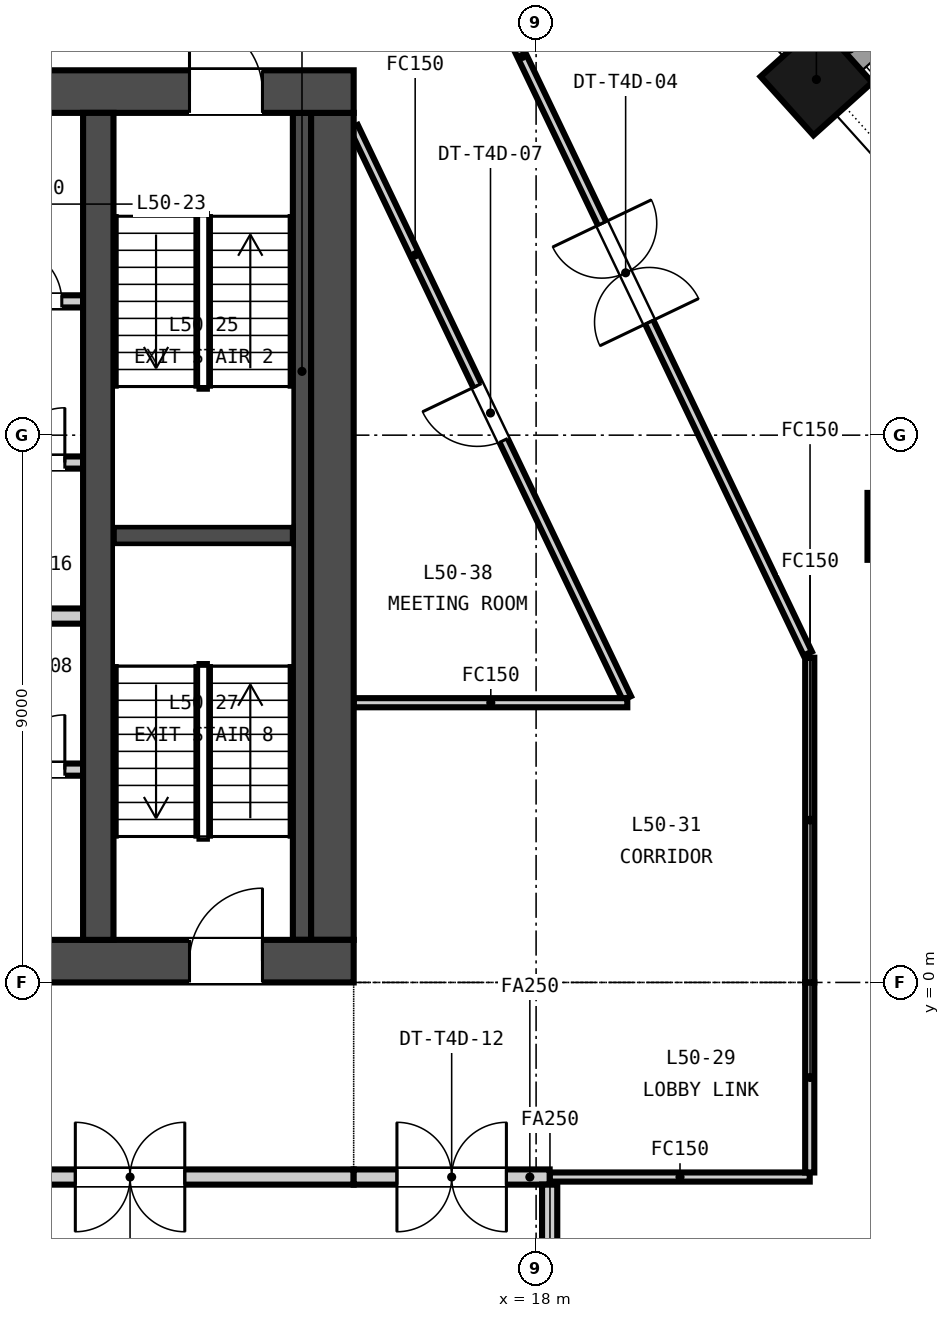
"""IFC4 building model, lengths in metres.
Left out: names, types, materials, properties, quantities, classifications, styles, units other than length and angle.
Written with IfcOpenShell. Run it as: python <this file> out.ifc"""

import sys

from ifc_helpers import new_model, si_unit, direction, frame, frame_2d, origin, origin_2d, place, context, subcontext, project, spatial, rectangle, extrude, element, fill, save


model = new_model("IFC4")
c1 = context("Model", 3, precision=1e-05, world=origin(), true_north=direction((0.0, 1.0)))
c2 = subcontext(c1, "Body", "Model", "MODEL_VIEW")
j1 = project(units=[si_unit("LENGTHUNIT", "METRE"), si_unit("PLANEANGLEUNIT", "RADIAN")], contexts=[c1])
p1 = place(None, origin())
s1 = spatial("IfcSite", under=j1, at=p1, CompositionType="ELEMENT")
p2 = place(p1, origin())
s2 = spatial("IfcBuilding", under=s1, at=p2, CompositionType="ELEMENT")
p3 = place(p2, frame((0.0, 0.0, 200.0)))
s3 = spatial("IfcBuildingStorey", under=s2, at=p3, CompositionType="ELEMENT", Elevation=200.0)
p4 = place(p3, frame((-15.0, 0.35, -0.15), z_axis=(0.0, 0.0, 1.0), x_axis=(1.0, 0.0, 0.0)))
e1 = element("IfcWall", 1, at=p4, inside=s3, PredefinedType="SOLIDWALL", context=c2, shape_type="SweptSolid", body=[
    extrude(rectangle(XDim=30.0, YDim=0.7, at=frame_2d((15.0, 0.0))), origin(), (0.0, 0.0, 1.0), 3.65),
])
p5 = place(p4, frame((5.8, 0.0, 0.15)))
e2 = element("IfcOpeningElement", 2, at=p5, cuts=e1, PredefinedType="OPENING", context=c2, shape_type="SweptSolid", body=[
    extrude(rectangle(XDim=2.4, YDim=2.4, at=frame_2d((1.2, 1.2))), frame((0.0, 0.36, 0.0), z_axis=(0.0, -1.0, 0.0), x_axis=(1.0, 0.0, 0.0)), (0.0, 0.0, 1.0), 0.72),
])
p6 = place(p4, frame((13.8, 0.0, 0.15)))
e3 = element("IfcOpeningElement", 3, at=p6, cuts=e1, PredefinedType="OPENING", context=c2, shape_type="SweptSolid", body=[
    extrude(rectangle(XDim=2.4, YDim=2.4, at=frame_2d((1.2, 1.2))), frame((0.0, 0.36, 0.0), z_axis=(0.0, -1.0, 0.0), x_axis=(1.0, 0.0, 0.0)), (0.0, 0.0, 1.0), 0.72),
])
p7 = place(p4, frame((21.8, 0.0, 0.15)))
e4 = element("IfcOpeningElement", 4, at=p7, cuts=e1, PredefinedType="OPENING", context=c2, shape_type="SweptSolid", body=[
    extrude(rectangle(XDim=2.4, YDim=2.4, at=frame_2d((1.2, 1.2))), frame((0.0, 0.36, 0.0), z_axis=(0.0, -1.0, 0.0), x_axis=(1.0, 0.0, 0.0)), (0.0, 0.0, 1.0), 0.72),
])
p8 = place(p4, frame((1.5, 0.0, 0.15)))
e5 = element("IfcOpeningElement", 5, at=p8, cuts=e1, PredefinedType="OPENING", context=c2, shape_type="SweptSolid", body=[
    extrude(rectangle(XDim=1.2, YDim=2.1, at=frame_2d((0.6, 1.05))), frame((0.0, 0.36, 0.0), z_axis=(0.0, -1.0, 0.0), x_axis=(1.0, 0.0, 0.0)), (0.0, 0.0, 1.0), 0.72),
])
p9 = place(p4, frame((27.3, 0.0, 0.15)))
e6 = element("IfcOpeningElement", 6, at=p9, cuts=e1, PredefinedType="OPENING", context=c2, shape_type="SweptSolid", body=[
    extrude(rectangle(XDim=1.2, YDim=2.1, at=frame_2d((0.6, 1.05))), frame((0.0, 0.36, 0.0), z_axis=(0.0, -1.0, 0.0), x_axis=(1.0, 0.0, 0.0)), (0.0, 0.0, 1.0), 0.72),
])
p10 = place(p3, frame((-15.0, 14.65, -0.15), z_axis=(0.0, 0.0, 1.0), x_axis=(1.0, 0.0, 0.0)))
e7 = element("IfcWall", 7, at=p10, inside=s3, PredefinedType="SOLIDWALL", context=c2, shape_type="SweptSolid", body=[
    extrude(rectangle(XDim=30.0, YDim=0.7, at=frame_2d((15.0, 0.0))), origin(), (0.0, 0.0, 1.0), 3.65),
])
p11 = place(p10, frame((9.25, 0.0, 0.15)))
e8 = element("IfcOpeningElement", 8, at=p11, cuts=e7, PredefinedType="OPENING", context=c2, shape_type="SweptSolid", body=[
    extrude(rectangle(XDim=1.5, YDim=2.1, at=frame_2d((0.75, 1.05))), frame((0.0, 0.36, 0.0), z_axis=(0.0, -1.0, 0.0), x_axis=(1.0, 0.0, 0.0)), (0.0, 0.0, 1.0), 0.72),
])
p12 = place(p10, frame((19.4, 0.0, 0.15)))
e9 = element("IfcOpeningElement", 9, at=p12, cuts=e7, PredefinedType="OPENING", context=c2, shape_type="SweptSolid", body=[
    extrude(rectangle(XDim=1.5, YDim=2.1, at=frame_2d((0.75, 1.05))), frame((0.0, 0.36, 0.0), z_axis=(0.0, -1.0, 0.0), x_axis=(1.0, 0.0, 0.0)), (0.0, 0.0, 1.0), 0.72),
])
p13 = place(p10, frame((1.5, 0.0, 0.15)))
e10 = element("IfcOpeningElement", 10, at=p13, cuts=e7, PredefinedType="OPENING", context=c2, shape_type="SweptSolid", body=[
    extrude(rectangle(XDim=1.2, YDim=2.1, at=frame_2d((0.6, 1.05))), frame((0.0, 0.36, 0.0), z_axis=(0.0, -1.0, 0.0), x_axis=(1.0, 0.0, 0.0)), (0.0, 0.0, 1.0), 0.72),
])
p14 = place(p10, frame((27.3, 0.0, 0.15)))
e11 = element("IfcOpeningElement", 11, at=p14, cuts=e7, PredefinedType="OPENING", context=c2, shape_type="SweptSolid", body=[
    extrude(rectangle(XDim=1.2, YDim=2.1, at=frame_2d((0.6, 1.05))), frame((0.0, 0.36, 0.0), z_axis=(0.0, -1.0, 0.0), x_axis=(1.0, 0.0, 0.0)), (0.0, 0.0, 1.0), 0.72),
])
p15 = place(p3, frame((14.65, 0.7, -0.15), z_axis=(0.0, 0.0, 1.0), x_axis=(0.0, 1.0, 0.0)))
e12 = element("IfcWall", 12, at=p15, inside=s3, PredefinedType="SOLIDWALL", context=c2, shape_type="SweptSolid", body=[
    extrude(rectangle(XDim=13.6, YDim=0.7, at=frame_2d((6.8, 0.0))), origin(), (0.0, 0.0, 1.0), 3.65),
])
p16 = place(p3, frame((10.8, 0.7, -0.15), z_axis=(0.0, 0.0, 1.0), x_axis=(0.0, 1.0, 0.0)))
e13 = element("IfcWall", 13, at=p16, inside=s3, PredefinedType="SOLIDWALL", context=c2, shape_type="SweptSolid", body=[
    extrude(rectangle(XDim=13.6, YDim=0.5, at=frame_2d((6.8, 0.0))), origin(), (0.0, 0.0, 1.0), 3.65),
])
p17 = place(p3, frame((22.61, 14.849, -0.15), z_axis=(0.0, 0.0, 1.0), x_axis=(-0.669130606359, 0.743144825477, 0.0)))
e14 = element("IfcColumn", 14, at=p17, inside=s3, PredefinedType="COLUMN", context=c2, shape_type="SweptSolid", body=[
    extrude(rectangle(XDim=1.3, YDim=1.3, at=origin_2d()), origin(), (0.0, 0.0, 1.0), 3.65),
])
p18 = place(p3, frame((24.0, 7.5, -0.15), z_axis=(0.0, 0.0, 1.0), x_axis=(1.0, 0.0, 0.0)))
e15 = element("IfcColumn", 15, at=p18, inside=s3, PredefinedType="COLUMN", context=c2, shape_type="SweptSolid", body=[
    extrude(rectangle(XDim=1.1, YDim=1.1, at=origin_2d()), origin(), (0.0, 0.0, 1.0), 3.65),
])
p19 = place(p3, frame((-10.55, 3.5, 0.0), z_axis=(0.0, 0.0, 1.0), x_axis=(1.0, 0.0, 0.0)))
e16 = element("IfcWall", 16, at=p19, inside=s3, PredefinedType="PARTITIONING", context=c2, shape_type="SweptSolid", body=[
    extrude(rectangle(XDim=21.1, YDim=0.2, at=frame_2d((10.55, 0.0))), origin(), (0.0, 0.0, 1.0), 3.5),
])
p20 = place(p19, frame((1.262, 0.0, 0.0)))
e17 = element("IfcOpeningElement", 17, at=p20, cuts=e16, PredefinedType="OPENING", context=c2, shape_type="SweptSolid", body=[
    extrude(rectangle(XDim=1.0, YDim=2.1, at=frame_2d((0.5, 1.05))), frame((0.0, 0.11, 0.0), z_axis=(0.0, -1.0, 0.0), x_axis=(1.0, 0.0, 0.0)), (0.0, 0.0, 1.0), 0.22),
])
p21 = place(p19, frame((6.0, 0.0, 0.0)))
e18 = element("IfcOpeningElement", 18, at=p21, cuts=e16, PredefinedType="OPENING", context=c2, shape_type="SweptSolid", body=[
    extrude(rectangle(XDim=1.0, YDim=2.1, at=frame_2d((0.5, 1.05))), frame((0.0, 0.11, 0.0), z_axis=(0.0, -1.0, 0.0), x_axis=(1.0, 0.0, 0.0)), (0.0, 0.0, 1.0), 0.22),
])
p22 = place(p19, frame((11.1, 0.0, 0.0)))
e19 = element("IfcOpeningElement", 19, at=p22, cuts=e16, PredefinedType="OPENING", context=c2, shape_type="SweptSolid", body=[
    extrude(rectangle(XDim=1.0, YDim=2.1, at=frame_2d((0.5, 1.05))), frame((0.0, 0.11, 0.0), z_axis=(0.0, -1.0, 0.0), x_axis=(1.0, 0.0, 0.0)), (0.0, 0.0, 1.0), 0.22),
])
p23 = place(p19, frame((16.113, 0.0, 0.0)))
e20 = element("IfcOpeningElement", 20, at=p23, cuts=e16, PredefinedType="OPENING", context=c2, shape_type="SweptSolid", body=[
    extrude(rectangle(XDim=1.0, YDim=2.1, at=frame_2d((0.5, 1.05))), frame((0.0, 0.11, 0.0), z_axis=(0.0, -1.0, 0.0), x_axis=(1.0, 0.0, 0.0)), (0.0, 0.0, 1.0), 0.22),
])
p24 = place(p19, frame((19.9, 0.0, 0.0)))
e21 = element("IfcOpeningElement", 21, at=p24, cuts=e16, PredefinedType="OPENING", context=c2, shape_type="SweptSolid", body=[
    extrude(rectangle(XDim=0.9, YDim=2.1, at=frame_2d((0.45, 1.05))), frame((0.0, 0.11, 0.0), z_axis=(0.0, -1.0, 0.0), x_axis=(1.0, 0.0, 0.0)), (0.0, 0.0, 1.0), 0.22),
])
p25 = place(p3, frame((-10.55, 6.025, 0.0), z_axis=(0.0, 0.0, 1.0), x_axis=(1.0, 0.0, 0.0)))
e22 = element("IfcWall", 22, at=p25, inside=s3, PredefinedType="PARTITIONING", context=c2, shape_type="SweptSolid", body=[
    extrude(rectangle(XDim=21.1, YDim=0.25, at=frame_2d((10.55, 0.0))), origin(), (0.0, 0.0, 1.0), 3.5),
])
p26 = place(p3, frame((-10.55, 8.55, 0.0), z_axis=(0.0, 0.0, 1.0), x_axis=(1.0, 0.0, 0.0)))
e23 = element("IfcWall", 23, at=p26, inside=s3, PredefinedType="PARTITIONING", context=c2, shape_type="SweptSolid", body=[
    extrude(rectangle(XDim=21.1, YDim=0.2, at=frame_2d((10.55, 0.0))), origin(), (0.0, 0.0, 1.0), 3.5),
])
p27 = place(p26, frame((0.675, 0.0, 0.0)))
e24 = element("IfcOpeningElement", 24, at=p27, cuts=e23, PredefinedType="OPENING", context=c2, shape_type="SweptSolid", body=[
    extrude(rectangle(XDim=1.2, YDim=2.1, at=frame_2d((0.6, 1.05))), frame((0.0, 0.11, 0.0), z_axis=(0.0, -1.0, 0.0), x_axis=(1.0, 0.0, 0.0)), (0.0, 0.0, 1.0), 0.22),
])
p28 = place(p26, frame((3.475, 0.0, 0.0)))
e25 = element("IfcOpeningElement", 25, at=p28, cuts=e23, PredefinedType="OPENING", context=c2, shape_type="SweptSolid", body=[
    extrude(rectangle(XDim=1.2, YDim=2.1, at=frame_2d((0.6, 1.05))), frame((0.0, 0.11, 0.0), z_axis=(0.0, -1.0, 0.0), x_axis=(1.0, 0.0, 0.0)), (0.0, 0.0, 1.0), 0.22),
])
p29 = place(p26, frame((6.275, 0.0, 0.0)))
e26 = element("IfcOpeningElement", 26, at=p29, cuts=e23, PredefinedType="OPENING", context=c2, shape_type="SweptSolid", body=[
    extrude(rectangle(XDim=1.2, YDim=2.1, at=frame_2d((0.6, 1.05))), frame((0.0, 0.11, 0.0), z_axis=(0.0, -1.0, 0.0), x_axis=(1.0, 0.0, 0.0)), (0.0, 0.0, 1.0), 0.22),
])
p30 = place(p26, frame((9.075, 0.0, 0.0)))
e27 = element("IfcOpeningElement", 27, at=p30, cuts=e23, PredefinedType="OPENING", context=c2, shape_type="SweptSolid", body=[
    extrude(rectangle(XDim=1.2, YDim=2.1, at=frame_2d((0.6, 1.05))), frame((0.0, 0.11, 0.0), z_axis=(0.0, -1.0, 0.0), x_axis=(1.0, 0.0, 0.0)), (0.0, 0.0, 1.0), 0.22),
])
p31 = place(p26, frame((11.875, 0.0, 0.0)))
e28 = element("IfcOpeningElement", 28, at=p31, cuts=e23, PredefinedType="OPENING", context=c2, shape_type="SweptSolid", body=[
    extrude(rectangle(XDim=1.2, YDim=2.1, at=frame_2d((0.6, 1.05))), frame((0.0, 0.11, 0.0), z_axis=(0.0, -1.0, 0.0), x_axis=(1.0, 0.0, 0.0)), (0.0, 0.0, 1.0), 0.22),
])
p32 = place(p26, frame((14.675, 0.0, 0.0)))
e29 = element("IfcOpeningElement", 29, at=p32, cuts=e23, PredefinedType="OPENING", context=c2, shape_type="SweptSolid", body=[
    extrude(rectangle(XDim=1.2, YDim=2.1, at=frame_2d((0.6, 1.05))), frame((0.0, 0.11, 0.0), z_axis=(0.0, -1.0, 0.0), x_axis=(1.0, 0.0, 0.0)), (0.0, 0.0, 1.0), 0.22),
])
p33 = place(p26, frame((17.475, 0.0, 0.0)))
e30 = element("IfcOpeningElement", 30, at=p33, cuts=e23, PredefinedType="OPENING", context=c2, shape_type="SweptSolid", body=[
    extrude(rectangle(XDim=1.2, YDim=2.1, at=frame_2d((0.6, 1.05))), frame((0.0, 0.11, 0.0), z_axis=(0.0, -1.0, 0.0), x_axis=(1.0, 0.0, 0.0)), (0.0, 0.0, 1.0), 0.22),
])
p34 = place(p26, frame((19.9, 0.0, 0.0)))
e31 = element("IfcOpeningElement", 31, at=p34, cuts=e23, PredefinedType="OPENING", context=c2, shape_type="SweptSolid", body=[
    extrude(rectangle(XDim=0.9, YDim=2.1, at=frame_2d((0.45, 1.05))), frame((0.0, 0.11, 0.0), z_axis=(0.0, -1.0, 0.0), x_axis=(1.0, 0.0, 0.0)), (0.0, 0.0, 1.0), 0.22),
])
p35 = place(p3, frame((5.9, 11.2, 0.0), z_axis=(0.0, 0.0, 1.0), x_axis=(1.0, 0.0, 0.0)))
e32 = element("IfcWall", 32, at=p35, inside=s3, PredefinedType="PARTITIONING", context=c2, shape_type="SweptSolid", body=[
    extrude(rectangle(XDim=4.65, YDim=0.2, at=frame_2d((2.325, 0.0))), origin(), (0.0, 0.0, 1.0), 3.5),
])
p36 = place(p35, frame((3.4, 0.0, 0.0)))
e33 = element("IfcOpeningElement", 33, at=p36, cuts=e32, PredefinedType="OPENING", context=c2, shape_type="SweptSolid", body=[
    extrude(rectangle(XDim=0.9, YDim=2.1, at=frame_2d((0.45, 1.05))), frame((0.0, 0.11, 0.0), z_axis=(0.0, -1.0, 0.0), x_axis=(1.0, 0.0, 0.0)), (0.0, 0.0, 1.0), 0.22),
])
p37 = place(p3, frame((11.05, 7.35, 0.0), z_axis=(0.0, 0.0, 1.0), x_axis=(1.0, 0.0, 0.0)))
e34 = element("IfcWall", 34, at=p37, inside=s3, PredefinedType="SOLIDWALL", context=c2, shape_type="SweptSolid", body=[
    extrude(rectangle(XDim=2.95, YDim=0.3, at=frame_2d((1.475, 0.0))), origin(), (0.0, 0.0, 1.0), 3.5),
])
p38 = place(p3, frame((14.15, 0.7, 0.0), z_axis=(0.0, 0.0, 1.0), x_axis=(0.0, 1.0, 0.0)))
e35 = element("IfcWall", 35, at=p38, inside=s3, PredefinedType="SOLIDWALL", context=c2, shape_type="SweptSolid", body=[
    extrude(rectangle(XDim=13.6, YDim=0.3, at=frame_2d((6.8, 0.0))), origin(), (0.0, 0.0, 1.0), 3.5),
])
p39 = place(p3, frame((15.0, -3.2, 0.0), z_axis=(0.0, 0.0, 1.0), x_axis=(-1.0, 0.0, 0.0)))
e36 = element("IfcWall", 36, at=p39, inside=s3, PredefinedType="PARTITIONING", context=c2, shape_type="SweptSolid", body=[
    extrude(rectangle(XDim=7.355, YDim=0.25, at=frame_2d((3.677, 0.0))), origin(), (0.0, 0.0, 1.0), 2.741),
])
p40 = place(p39, frame((2.778, 0.0, 0.0)))
e37 = element("IfcOpeningElement", 37, at=p40, cuts=e36, PredefinedType="OPENING", context=c2, shape_type="SweptSolid", body=[
    extrude(rectangle(XDim=1.8, YDim=2.1, at=frame_2d((0.9, 1.05))), frame((0.0, 0.135, 0.0), z_axis=(0.0, -1.0, 0.0), x_axis=(1.0, 0.0, 0.0)), (0.0, 0.0, 1.0), 0.27),
])
p41 = place(p3, frame((22.5, -3.2, 0.0), z_axis=(0.0, 0.0, 1.0), x_axis=(-1.0, 0.0, 0.0)))
e38 = element("IfcWall", 38, at=p41, inside=s3, PredefinedType="PARTITIONING", context=c2, shape_type="SweptSolid", body=[
    extrude(rectangle(XDim=4.277, YDim=0.15, at=frame_2d((2.139, 0.0))), origin(), (0.0, 0.0, 1.0), 2.741),
])
p42 = place(p3, frame((22.5, 0.0, 0.0), z_axis=(0.0, 0.0, 1.0), x_axis=(0.0, -1.0, 0.0)))
e39 = element("IfcWall", 39, at=p42, inside=s3, PredefinedType="PARTITIONING", context=c2, shape_type="SweptSolid", body=[
    extrude(rectangle(XDim=3.125, YDim=0.15, at=frame_2d((1.562, 0.0))), origin(), (0.0, 0.0, 1.0), 2.741),
])
p43 = place(p3, frame((18.223, -3.2, 0.0), z_axis=(0.0, 0.0, 1.0), x_axis=(-1.0, 0.0, 0.0)))
e40 = element("IfcWall", 40, at=p43, inside=s3, PredefinedType="PARTITIONING", context=c2, shape_type="SweptSolid", body=[
    extrude(rectangle(XDim=3.223, YDim=0.25, at=frame_2d((1.611, 0.0))), origin(), (0.0, 0.0, 1.0), 2.741),
])
p44 = place(p43, frame((0.711, 0.0, 0.0)))
e41 = element("IfcOpeningElement", 41, at=p44, cuts=e40, PredefinedType="OPENING", context=c2, shape_type="SweptSolid", body=[
    extrude(rectangle(XDim=1.8, YDim=2.1, at=frame_2d((0.9, 1.05))), frame((0.0, 0.135, 0.0), z_axis=(0.0, -1.0, 0.0), x_axis=(1.0, 0.0, 0.0)), (0.0, 0.0, 1.0), 0.27),
])
p45 = place(p3, frame((22.5, 5.34, 0.0), z_axis=(0.0, 0.0, 1.0), x_axis=(0.0, -1.0, 0.0)))
e42 = element("IfcWall", 42, at=p45, inside=s3, PredefinedType="PARTITIONING", context=c2, shape_type="SweptSolid", body=[
    extrude(rectangle(XDim=5.34, YDim=0.15, at=frame_2d((2.67, 0.0))), origin(), (0.0, 0.0, 1.0), 2.741),
])
p46 = place(p3, frame((19.493, 4.675, 0.0), z_axis=(0.0, 0.0, 1.0), x_axis=(-0.43146462293, 0.902129857149, 0.0)))
e43 = element("IfcWall", 43, at=p46, inside=s3, PredefinedType="PARTITIONING", context=c2, shape_type="SweptSolid", body=[
    extrude(rectangle(XDim=10.413, YDim=0.15, at=frame_2d((5.207, 0.0))), origin(), (0.0, 0.0, 1.0), 2.741),
])
p47 = place(p46, frame((4.698, 0.0, 0.0)))
e44 = element("IfcOpeningElement", 44, at=p47, cuts=e43, PredefinedType="OPENING", context=c2, shape_type="SweptSolid", body=[
    extrude(rectangle(XDim=1.0, YDim=2.1, at=frame_2d((0.5, 1.05))), frame((0.0, 0.085, 0.0), z_axis=(0.0, -1.0, 0.0), x_axis=(1.0, 0.0, 0.0)), (0.0, 0.0, 1.0), 0.17),
])
p48 = place(p3, frame((16.477, 17.932, 0.0), z_axis=(0.0, 0.0, 1.0), x_axis=(0.431466075341, -0.902129162498, 0.0)))
e45 = element("IfcWall", 45, at=p48, inside=s3, PredefinedType="PARTITIONING", context=c2, shape_type="SweptSolid", body=[
    extrude(rectangle(XDim=13.884, YDim=0.15, at=frame_2d((6.942, 0.0))), origin(), (0.0, 0.0, 1.0), 2.741),
])
p49 = place(p48, frame((6.042, 0.0, 0.0)))
e46 = element("IfcOpeningElement", 46, at=p49, cuts=e45, PredefinedType="OPENING", context=c2, shape_type="SweptSolid", body=[
    extrude(rectangle(XDim=1.8, YDim=2.1, at=frame_2d((0.9, 1.05))), frame((0.0, 0.085, 0.0), z_axis=(0.0, -1.0, 0.0), x_axis=(1.0, 0.0, 0.0)), (0.0, 0.0, 1.0), 0.17),
])
p50 = place(p3, frame((15.0, 4.6, 0.0), z_axis=(0.0, 0.0, 1.0), x_axis=(1.0, 0.0, 0.0)))
e47 = element("IfcWall", 47, at=p50, inside=s3, PredefinedType="PARTITIONING", context=c2, shape_type="SweptSolid", body=[
    extrude(rectangle(XDim=4.5, YDim=0.15, at=frame_2d((2.25, 0.0))), origin(), (0.0, 0.0, 1.0), 2.741),
])
p51 = place(p3, frame((18.223, -9.686, 0.0), z_axis=(0.0, 0.0, 1.0), x_axis=(0.0, 1.0, 0.0)))
e48 = element("IfcWall", 48, at=p51, inside=s3, PredefinedType="PARTITIONING", context=c2, shape_type="SweptSolid", body=[
    extrude(rectangle(XDim=6.361, YDim=0.25, at=frame_2d((3.181, 0.0))), origin(), (0.0, 0.0, 1.0), 2.741),
])
p52 = place(p24, origin())
e49 = element("IfcDoor", 49, at=p52, inside=s3, OperationType="SINGLE_SWING_RIGHT", PredefinedType="DOOR", context=c2, shape_type="SweptSolid", body=[
    extrude(rectangle(XDim=0.9, YDim=2.1, at=frame_2d((0.45, 1.05))), frame((0.0, 0.025, 0.0), z_axis=(0.0, -1.0, 0.0), x_axis=(1.0, 0.0, 0.0)), (0.0, 0.0, 1.0), 0.05),
])
fill(e21, e49)
p53 = place(p34, origin())
e50 = element("IfcDoor", 50, at=p53, inside=s3, OperationType="SINGLE_SWING_RIGHT", PredefinedType="DOOR", context=c2, shape_type="SweptSolid", body=[
    extrude(rectangle(XDim=0.9, YDim=2.1, at=frame_2d((0.45, 1.05))), frame((0.0, 0.025, 0.0), z_axis=(0.0, -1.0, 0.0), x_axis=(1.0, 0.0, 0.0)), (0.0, 0.0, 1.0), 0.05),
])
fill(e31, e50)
p54 = place(p36, origin())
e51 = element("IfcDoor", 51, at=p54, inside=s3, OperationType="SINGLE_SWING_LEFT", PredefinedType="DOOR", context=c2, shape_type="SweptSolid", body=[
    extrude(rectangle(XDim=0.9, YDim=2.1, at=frame_2d((0.45, 1.05))), frame((0.0, 0.025, 0.0), z_axis=(0.0, -1.0, 0.0), x_axis=(1.0, 0.0, 0.0)), (0.0, 0.0, 1.0), 0.05),
])
fill(e33, e51)
p55 = place(p14, origin())
e52 = element("IfcDoor", 52, at=p55, inside=s3, OperationType="SINGLE_SWING_LEFT", PredefinedType="DOOR", context=c2, shape_type="SweptSolid", body=[
    extrude(rectangle(XDim=1.2, YDim=2.1, at=frame_2d((0.6, 1.05))), frame((0.0, 0.025, 0.0), z_axis=(0.0, -1.0, 0.0), x_axis=(1.0, 0.0, 0.0)), (0.0, 0.0, 1.0), 0.05),
])
fill(e11, e52)
p56 = place(p9, origin())
e53 = element("IfcDoor", 53, at=p56, inside=s3, OperationType="SINGLE_SWING_RIGHT", PredefinedType="DOOR", context=c2, shape_type="SweptSolid", body=[
    extrude(rectangle(XDim=1.2, YDim=2.1, at=frame_2d((0.6, 1.05))), frame((0.0, 0.025, 0.0), z_axis=(0.0, -1.0, 0.0), x_axis=(1.0, 0.0, 0.0)), (0.0, 0.0, 1.0), 0.05),
])
fill(e6, e53)
p57 = place(p49, origin())
e54 = element("IfcDoor", 54, at=p57, inside=s3, OperationType="DOUBLE_DOOR_DOUBLE_SWING", PredefinedType="DOOR", context=c2, shape_type="SweptSolid", body=[
    extrude(rectangle(XDim=1.8, YDim=2.1, at=frame_2d((0.9, 1.05))), frame((0.0, 0.025, 0.0), z_axis=(0.0, -1.0, 0.0), x_axis=(1.0, 0.0, 0.0)), (0.0, 0.0, 1.0), 0.05),
])
fill(e46, e54)
p58 = place(p47, origin())
e55 = element("IfcDoor", 55, at=p58, inside=s3, OperationType="SINGLE_SWING_RIGHT", PredefinedType="DOOR", context=c2, shape_type="SweptSolid", body=[
    extrude(rectangle(XDim=1.0, YDim=2.1, at=frame_2d((0.5, 1.05))), frame((0.0, 0.025, 0.0), z_axis=(0.0, -1.0, 0.0), x_axis=(1.0, 0.0, 0.0)), (0.0, 0.0, 1.0), 0.05),
])
fill(e44, e55)
p59 = place(p40, origin())
e56 = element("IfcDoor", 56, at=p59, inside=s3, OperationType="DOUBLE_DOOR_DOUBLE_SWING", PredefinedType="DOOR", context=c2, shape_type="SweptSolid", body=[
    extrude(rectangle(XDim=1.8, YDim=2.1, at=frame_2d((0.9, 1.05))), frame((0.0, 0.025, 0.0), z_axis=(0.0, -1.0, 0.0), x_axis=(1.0, 0.0, 0.0)), (0.0, 0.0, 1.0), 0.05),
])
fill(e37, e56)
p60 = place(p44, origin())
e57 = element("IfcDoor", 57, at=p60, inside=s3, OperationType="DOUBLE_DOOR_DOUBLE_SWING", PredefinedType="DOOR", context=c2, shape_type="SweptSolid", body=[
    extrude(rectangle(XDim=1.8, YDim=2.1, at=frame_2d((0.9, 1.05))), frame((0.0, 0.025, 0.0), z_axis=(0.0, -1.0, 0.0), x_axis=(1.0, 0.0, 0.0)), (0.0, 0.0, 1.0), 0.05),
])
fill(e41, e57)
save(model, sys.argv[1])
